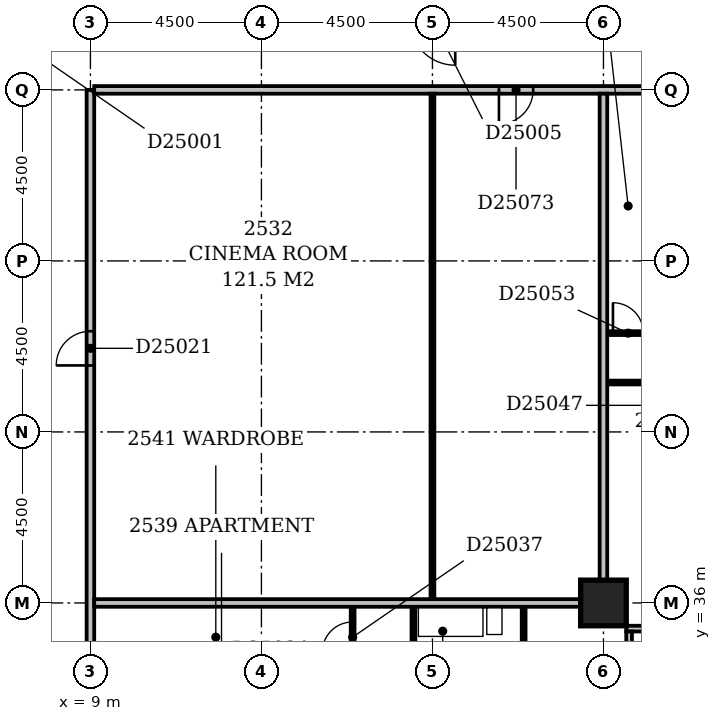
"""IFC4 building model, lengths in metres.
Left out: names, types, materials, properties, quantities, classifications, styles, units other than length and angle.
Written with IfcOpenShell. Run it as: python <this file> out.ifc"""

import sys

from ifc_helpers import new_model, si_unit, direction, frame, frame_2d, origin, origin_2d, place, context, subcontext, project, spatial, rectangle, extrude, element, fill, save


model = new_model("IFC4")
c1 = context("Model", 3, precision=1e-05, world=origin(), true_north=direction((0.0, 1.0)))
c2 = subcontext(c1, "Body", "Model", "MODEL_VIEW")
j1 = project(units=[si_unit("LENGTHUNIT", "METRE"), si_unit("PLANEANGLEUNIT", "RADIAN")], contexts=[c1])
p1 = place(None, origin())
s1 = spatial("IfcSite", under=j1, at=p1, CompositionType="ELEMENT")
p2 = place(p1, origin())
s2 = spatial("IfcBuilding", under=s1, at=p2, CompositionType="ELEMENT")
p3 = place(p2, frame((0.0, 0.0, 101.0)))
s3 = spatial("IfcBuildingStorey", under=s2, at=p3, CompositionType="ELEMENT", Elevation=101.0)
p4 = place(p3, frame((22.5, 36.0, -0.3), z_axis=(0.0, 0.0, 1.0), x_axis=(1.0, 0.0, 0.0)))
e1 = element("IfcColumn", 1, at=p4, inside=s3, PredefinedType="COLUMN", context=c2, shape_type="SweptSolid", body=[
    extrude(rectangle(XDim=1.2, YDim=1.2, at=origin_2d()), origin(), (0.0, 0.0, 1.0), 3.6),
])
p5 = place(p3, frame((23.175, 17.4, 0.0), z_axis=(0.0, 0.0, 1.0), x_axis=(0.0, 1.0, 0.0)))
e2 = element("IfcWall", 2, at=p5, inside=s3, PredefinedType="STANDARD", context=c2, shape_type="SweptSolid", body=[
    extrude(rectangle(XDim=17.85, YDim=0.15, at=frame_2d((8.925, 0.0))), origin(), (0.0, 0.0, 1.0), 2.7),
])
p6 = place(p5, frame((1.65, 0.0, 0.6)))
e3 = element("IfcOpeningElement", 3, at=p6, cuts=e2, PredefinedType="OPENING", context=c2, shape_type="SweptSolid", body=[
    extrude(rectangle(XDim=2.4, YDim=1.8, at=frame_2d((1.2, 0.9))), frame((0.0, 0.087, 0.0), z_axis=(0.0, -1.0, 0.0), x_axis=(1.0, 0.0, 0.0)), (0.0, 0.0, 1.0), 0.174),
])
p7 = place(p5, frame((7.769, 0.0, 0.6)))
e4 = element("IfcOpeningElement", 4, at=p7, cuts=e2, PredefinedType="OPENING", context=c2, shape_type="SweptSolid", body=[
    extrude(rectangle(XDim=0.9, YDim=1.8, at=frame_2d((0.45, 0.9))), frame((0.0, 0.087, 0.0), z_axis=(0.0, -1.0, 0.0), x_axis=(1.0, 0.0, 0.0)), (0.0, 0.0, 1.0), 0.174),
])
p8 = place(p5, frame((10.65, 0.0, 0.6)))
e5 = element("IfcOpeningElement", 5, at=p8, cuts=e2, PredefinedType="OPENING", context=c2, shape_type="SweptSolid", body=[
    extrude(rectangle(XDim=2.4, YDim=1.8, at=frame_2d((1.2, 0.9))), frame((0.0, 0.087, 0.0), z_axis=(0.0, -1.0, 0.0), x_axis=(1.0, 0.0, 0.0)), (0.0, 0.0, 1.0), 0.174),
])
p9 = place(p5, frame((15.15, 0.0, 0.6)))
e6 = element("IfcOpeningElement", 6, at=p9, cuts=e2, PredefinedType="OPENING", context=c2, shape_type="SweptSolid", body=[
    extrude(rectangle(XDim=2.4, YDim=1.8, at=frame_2d((1.2, 0.9))), frame((0.0, 0.087, 0.0), z_axis=(0.0, -1.0, 0.0), x_axis=(1.0, 0.0, 0.0)), (0.0, 0.0, 1.0), 0.174),
])
p10 = place(p3, frame((23.1, 35.325, 0.0), z_axis=(0.0, 0.0, 1.0), x_axis=(1.0, 0.0, 0.0)))
e7 = element("IfcWall", 7, at=p10, inside=s3, PredefinedType="STANDARD", context=c2, shape_type="SweptSolid", body=[
    extrude(rectangle(XDim=45.15, YDim=0.15, at=frame_2d((22.575, 0.0))), origin(), (0.0, 0.0, 1.0), 2.7),
])
p11 = place(p10, frame((0.45, 0.0, 0.6)))
e8 = element("IfcOpeningElement", 8, at=p11, cuts=e7, PredefinedType="OPENING", context=c2, shape_type="SweptSolid", body=[
    extrude(rectangle(XDim=2.4, YDim=1.8, at=frame_2d((1.2, 0.9))), frame((0.0, 0.087, 0.0), z_axis=(0.0, -1.0, 0.0), x_axis=(1.0, 0.0, 0.0)), (0.0, 0.0, 1.0), 0.174),
])
p12 = place(p10, frame((5.728, 0.0, 0.6)))
e9 = element("IfcOpeningElement", 9, at=p12, cuts=e7, PredefinedType="OPENING", context=c2, shape_type="SweptSolid", body=[
    extrude(rectangle(XDim=1.8, YDim=1.8, at=frame_2d((0.9, 0.9))), frame((0.0, 0.087, 0.0), z_axis=(0.0, -1.0, 0.0), x_axis=(1.0, 0.0, 0.0)), (0.0, 0.0, 1.0), 0.174),
])
p13 = place(p10, frame((9.45, 0.0, 0.6)))
e10 = element("IfcOpeningElement", 10, at=p13, cuts=e7, PredefinedType="OPENING", context=c2, shape_type="SweptSolid", body=[
    extrude(rectangle(XDim=2.4, YDim=1.8, at=frame_2d((1.2, 0.9))), frame((0.0, 0.087, 0.0), z_axis=(0.0, -1.0, 0.0), x_axis=(1.0, 0.0, 0.0)), (0.0, 0.0, 1.0), 0.174),
])
p14 = place(p10, frame((13.95, 0.0, 0.6)))
e11 = element("IfcOpeningElement", 11, at=p14, cuts=e7, PredefinedType="OPENING", context=c2, shape_type="SweptSolid", body=[
    extrude(rectangle(XDim=2.4, YDim=1.8, at=frame_2d((1.2, 0.9))), frame((0.0, 0.087, 0.0), z_axis=(0.0, -1.0, 0.0), x_axis=(1.0, 0.0, 0.0)), (0.0, 0.0, 1.0), 0.174),
])
p15 = place(p10, frame((18.276, 0.0, 0.6)))
e12 = element("IfcOpeningElement", 12, at=p15, cuts=e7, PredefinedType="OPENING", context=c2, shape_type="SweptSolid", body=[
    extrude(rectangle(XDim=2.4, YDim=1.8, at=frame_2d((1.2, 0.9))), frame((0.0, 0.087, 0.0), z_axis=(0.0, -1.0, 0.0), x_axis=(1.0, 0.0, 0.0)), (0.0, 0.0, 1.0), 0.174),
])
p16 = place(p10, frame((22.95, 0.0, 0.6)))
e13 = element("IfcOpeningElement", 13, at=p16, cuts=e7, PredefinedType="OPENING", context=c2, shape_type="SweptSolid", body=[
    extrude(rectangle(XDim=2.4, YDim=1.8, at=frame_2d((1.2, 0.9))), frame((0.0, 0.087, 0.0), z_axis=(0.0, -1.0, 0.0), x_axis=(1.0, 0.0, 0.0)), (0.0, 0.0, 1.0), 0.174),
])
p17 = place(p10, frame((27.45, 0.0, 0.6)))
e14 = element("IfcOpeningElement", 14, at=p17, cuts=e7, PredefinedType="OPENING", context=c2, shape_type="SweptSolid", body=[
    extrude(rectangle(XDim=2.4, YDim=1.8, at=frame_2d((1.2, 0.9))), frame((0.0, 0.087, 0.0), z_axis=(0.0, -1.0, 0.0), x_axis=(1.0, 0.0, 0.0)), (0.0, 0.0, 1.0), 0.174),
])
p18 = place(p10, frame((33.921, 0.0, 0.6)))
e15 = element("IfcOpeningElement", 15, at=p18, cuts=e7, PredefinedType="OPENING", context=c2, shape_type="SweptSolid", body=[
    extrude(rectangle(XDim=0.6, YDim=1.8, at=frame_2d((0.3, 0.9))), frame((0.0, 0.087, 0.0), z_axis=(0.0, -1.0, 0.0), x_axis=(1.0, 0.0, 0.0)), (0.0, 0.0, 1.0), 0.174),
])
p19 = place(p10, frame((36.45, 0.0, 0.6)))
e16 = element("IfcOpeningElement", 16, at=p19, cuts=e7, PredefinedType="OPENING", context=c2, shape_type="SweptSolid", body=[
    extrude(rectangle(XDim=2.4, YDim=1.8, at=frame_2d((1.2, 0.9))), frame((0.0, 0.087, 0.0), z_axis=(0.0, -1.0, 0.0), x_axis=(1.0, 0.0, 0.0)), (0.0, 0.0, 1.0), 0.174),
])
p20 = place(p10, frame((40.95, 0.0, 0.6)))
e17 = element("IfcOpeningElement", 17, at=p20, cuts=e7, PredefinedType="OPENING", context=c2, shape_type="SweptSolid", body=[
    extrude(rectangle(XDim=2.4, YDim=1.8, at=frame_2d((1.2, 0.9))), frame((0.0, 0.087, 0.0), z_axis=(0.0, -1.0, 0.0), x_axis=(1.0, 0.0, 0.0)), (0.0, 0.0, 1.0), 0.174),
])
p21 = place(p3, frame((9.0, 5.0, 0.0), z_axis=(0.0, 0.0, 1.0), x_axis=(0.0, 1.0, 0.0)))
e18 = element("IfcWall", 18, at=p21, inside=s3, PredefinedType="PARTITIONING", context=c2, shape_type="SweptSolid", body=[
    extrude(rectangle(XDim=44.5, YDim=0.2, at=frame_2d((22.25, 0.0))), origin(), (0.0, 0.0, 1.0), 3.3),
])
p22 = place(p21, frame((18.4, 0.0, 0.0)))
e19 = element("IfcOpeningElement", 19, at=p22, cuts=e18, PredefinedType="OPENING", context=c2, shape_type="SweptSolid", body=[
    extrude(rectangle(XDim=1.0, YDim=2.1, at=frame_2d((0.5, 1.05))), frame((0.0, 0.112, 0.0), z_axis=(0.0, -1.0, 0.0), x_axis=(1.0, 0.0, 0.0)), (0.0, 0.0, 1.0), 0.224),
])
p23 = place(p21, frame((9.3, 0.0, 0.0)))
e20 = element("IfcOpeningElement", 20, at=p23, cuts=e18, PredefinedType="OPENING", context=c2, shape_type="SweptSolid", body=[
    extrude(rectangle(XDim=1.0, YDim=2.1, at=frame_2d((0.5, 1.05))), frame((0.0, 0.112, 0.0), z_axis=(0.0, -1.0, 0.0), x_axis=(1.0, 0.0, 0.0)), (0.0, 0.0, 1.0), 0.224),
])
p24 = place(p21, frame((37.25, 0.0, 0.0)))
e21 = element("IfcOpeningElement", 21, at=p24, cuts=e18, PredefinedType="OPENING", context=c2, shape_type="SweptSolid", body=[
    extrude(rectangle(XDim=0.9, YDim=2.1, at=frame_2d((0.45, 1.05))), frame((0.0, 0.112, 0.0), z_axis=(0.0, -1.0, 0.0), x_axis=(1.0, 0.0, 0.0)), (0.0, 0.0, 1.0), 0.224),
])
p25 = place(p21, frame((1.5, 0.0, 0.0)))
e22 = element("IfcOpeningElement", 22, at=p25, cuts=e18, PredefinedType="OPENING", context=c2, shape_type="SweptSolid", body=[
    extrude(rectangle(XDim=0.9, YDim=2.1, at=frame_2d((0.45, 1.05))), frame((0.0, 0.112, 0.0), z_axis=(0.0, -1.0, 0.0), x_axis=(1.0, 0.0, 0.0)), (0.0, 0.0, 1.0), 0.224),
])
p26 = place(p3, frame((17.5, 18.1, 0.0), z_axis=(0.0, 0.0, 1.0), x_axis=(0.0, 1.0, 0.0)))
e23 = element("IfcWall", 23, at=p26, inside=s3, PredefinedType="PARTITIONING", context=c2, shape_type="SweptSolid", body=[
    extrude(rectangle(XDim=17.8, YDim=0.1, at=frame_2d((8.9, 0.0))), origin(), (0.0, 0.0, 1.0), 3.3),
])
p27 = place(p26, frame((2.85, 0.0, 0.0)))
e24 = element("IfcOpeningElement", 24, at=p27, cuts=e23, PredefinedType="OPENING", context=c2, shape_type="SweptSolid", body=[
    extrude(rectangle(XDim=0.9, YDim=2.1, at=frame_2d((0.45, 1.05))), frame((0.0, 0.062, 0.0), z_axis=(0.0, -1.0, 0.0), x_axis=(1.0, 0.0, 0.0)), (0.0, 0.0, 1.0), 0.124),
])
p28 = place(p26, frame((8.4, 0.0, 0.0)))
e25 = element("IfcOpeningElement", 25, at=p28, cuts=e23, PredefinedType="OPENING", context=c2, shape_type="SweptSolid", body=[
    extrude(rectangle(XDim=0.9, YDim=2.1, at=frame_2d((0.45, 1.05))), frame((0.0, 0.062, 0.0), z_axis=(0.0, -1.0, 0.0), x_axis=(1.0, 0.0, 0.0)), (0.0, 0.0, 1.0), 0.124),
])
p29 = place(p26, frame((14.05, 0.0, 0.0)))
e26 = element("IfcOpeningElement", 26, at=p29, cuts=e23, PredefinedType="OPENING", context=c2, shape_type="SweptSolid", body=[
    extrude(rectangle(XDim=0.9, YDim=2.1, at=frame_2d((0.45, 1.05))), frame((0.0, 0.062, 0.0), z_axis=(0.0, -1.0, 0.0), x_axis=(1.0, 0.0, 0.0)), (0.0, 0.0, 1.0), 0.124),
])
p30 = place(p3, frame((15.9, 24.7, 0.0), z_axis=(0.0, 0.0, 1.0), x_axis=(0.0, 1.0, 0.0)))
e27 = element("IfcWall", 27, at=p30, inside=s3, PredefinedType="PARTITIONING", context=c2, shape_type="SweptSolid", body=[
    extrude(rectangle(XDim=11.2, YDim=0.1, at=frame_2d((5.6, 0.0))), origin(), (0.0, 0.0, 1.0), 3.3),
])
p31 = place(p30, frame((0.8, 0.0, 0.0)))
e28 = element("IfcOpeningElement", 28, at=p31, cuts=e27, PredefinedType="OPENING", context=c2, shape_type="SweptSolid", body=[
    extrude(rectangle(XDim=0.8, YDim=2.1, at=frame_2d((0.4, 1.05))), frame((0.0, 0.062, 0.0), z_axis=(0.0, -1.0, 0.0), x_axis=(1.0, 0.0, 0.0)), (0.0, 0.0, 1.0), 0.124),
])
p32 = place(p30, frame((8.1, 0.0, 0.0)))
e29 = element("IfcOpeningElement", 29, at=p32, cuts=e27, PredefinedType="OPENING", context=c2, shape_type="SweptSolid", body=[
    extrude(rectangle(XDim=0.8, YDim=2.1, at=frame_2d((0.4, 1.05))), frame((0.0, 0.062, 0.0), z_axis=(0.0, -1.0, 0.0), x_axis=(1.0, 0.0, 0.0)), (0.0, 0.0, 1.0), 0.124),
])
p33 = place(p30, frame((4.3, 0.0, 0.0)))
e30 = element("IfcOpeningElement", 30, at=p33, cuts=e27, PredefinedType="OPENING", context=c2, shape_type="SweptSolid", body=[
    extrude(rectangle(XDim=0.8, YDim=2.1, at=frame_2d((0.4, 1.05))), frame((0.0, 0.062, 0.0), z_axis=(0.0, -1.0, 0.0), x_axis=(1.0, 0.0, 0.0)), (0.0, 0.0, 1.0), 0.124),
])
p34 = place(p30, frame((6.1, 0.0, 0.0)))
e31 = element("IfcOpeningElement", 31, at=p34, cuts=e27, PredefinedType="OPENING", context=c2, shape_type="SweptSolid", body=[
    extrude(rectangle(XDim=0.8, YDim=2.1, at=frame_2d((0.4, 1.05))), frame((0.0, 0.062, 0.0), z_axis=(0.0, -1.0, 0.0), x_axis=(1.0, 0.0, 0.0)), (0.0, 0.0, 1.0), 0.124),
])
p35 = place(p30, frame((10.0, 0.0, 0.0)))
e32 = element("IfcOpeningElement", 32, at=p35, cuts=e27, PredefinedType="OPENING", context=c2, shape_type="SweptSolid", body=[
    extrude(rectangle(XDim=0.8, YDim=2.1, at=frame_2d((0.4, 1.05))), frame((0.0, 0.062, 0.0), z_axis=(0.0, -1.0, 0.0), x_axis=(1.0, 0.0, 0.0)), (0.0, 0.0, 1.0), 0.124),
])
p36 = place(p30, frame((2.75, 0.0, 0.0)))
e33 = element("IfcOpeningElement", 33, at=p36, cuts=e27, PredefinedType="OPENING", context=c2, shape_type="SweptSolid", body=[
    extrude(rectangle(XDim=0.8, YDim=2.1, at=frame_2d((0.4, 1.05))), frame((0.0, 0.062, 0.0), z_axis=(0.0, -1.0, 0.0), x_axis=(1.0, 0.0, 0.0)), (0.0, 0.0, 1.0), 0.124),
])
p37 = place(p3, frame((20.4, 33.7, 0.0), z_axis=(0.0, 0.0, 1.0), x_axis=(0.0, 1.0, 0.0)))
e34 = element("IfcWall", 34, at=p37, inside=s3, PredefinedType="PLUMBINGWALL", context=c2, shape_type="SweptSolid", body=[
    extrude(rectangle(XDim=2.2, YDim=0.1, at=frame_2d((1.1, 0.0))), origin(), (0.0, 0.0, 1.0), 3.3),
])
p38 = place(p3, frame((9.1, 36.0, 0.0), z_axis=(0.0, 0.0, 1.0), x_axis=(1.0, 0.0, 0.0)))
e35 = element("IfcWall", 35, at=p38, inside=s3, PredefinedType="PARTITIONING", context=c2, shape_type="SweptSolid", body=[
    extrude(rectangle(XDim=12.8, YDim=0.2, at=frame_2d((6.4, 0.0))), origin(), (0.0, 0.0, 1.0), 2.4),
])
p39 = place(p3, frame((18.0, 36.1, 0.0), z_axis=(0.0, 0.0, 1.0), x_axis=(0.0, 1.0, 0.0)))
e36 = element("IfcWall", 36, at=p39, inside=s3, PredefinedType="PARTITIONING", context=c2, shape_type="SweptSolid", body=[
    extrude(rectangle(XDim=13.3, YDim=0.1, at=frame_2d((6.65, 0.0))), origin(), (0.0, 0.0, 1.0), 3.3),
])
p40 = place(p3, frame((22.5, 36.6, 0.0), z_axis=(0.0, 0.0, 1.0), x_axis=(0.0, 1.0, 0.0)))
e37 = element("IfcWall", 37, at=p40, inside=s3, PredefinedType="PARTITIONING", context=c2, shape_type="SweptSolid", body=[
    extrude(rectangle(XDim=12.8, YDim=0.2, at=frame_2d((6.4, 0.0))), origin(), (0.0, 0.0, 1.0), 3.3),
])
p41 = place(p3, frame((22.6, 41.8, 0.0), z_axis=(0.0, 0.0, 1.0), x_axis=(1.0, 0.0, 0.0)))
e38 = element("IfcWall", 38, at=p41, inside=s3, PredefinedType="PARTITIONING", context=c2, shape_type="SweptSolid", body=[
    extrude(rectangle(XDim=4.3, YDim=0.1, at=frame_2d((2.15, 0.0))), origin(), (0.0, 0.0, 1.0), 3.3),
])
p42 = place(p41, frame((1.7, 0.0, 0.0)))
e39 = element("IfcOpeningElement", 39, at=p42, cuts=e38, PredefinedType="OPENING", context=c2, shape_type="SweptSolid", body=[
    extrude(rectangle(XDim=0.9, YDim=2.1, at=frame_2d((0.45, 1.05))), frame((0.0, 0.062, 0.0), z_axis=(0.0, -1.0, 0.0), x_axis=(1.0, 0.0, 0.0)), (0.0, 0.0, 1.0), 0.124),
])
p43 = place(p3, frame((22.6, 43.1, 0.0), z_axis=(0.0, 0.0, 1.0), x_axis=(1.0, 0.0, 0.0)))
e40 = element("IfcWall", 40, at=p43, inside=s3, PredefinedType="PARTITIONING", context=c2, shape_type="SweptSolid", body=[
    extrude(rectangle(XDim=1.15, YDim=0.1, at=frame_2d((0.575, 0.0))), origin(), (0.0, 0.0, 1.0), 3.3),
])
p44 = place(p43, frame((0.15, 0.0, 0.0)))
e41 = element("IfcOpeningElement", 41, at=p44, cuts=e40, PredefinedType="OPENING", context=c2, shape_type="SweptSolid", body=[
    extrude(rectangle(XDim=0.8, YDim=2.1, at=frame_2d((0.4, 1.05))), frame((0.0, 0.062, 0.0), z_axis=(0.0, -1.0, 0.0), x_axis=(1.0, 0.0, 0.0)), (0.0, 0.0, 1.0), 0.124),
])
p45 = place(p3, frame((9.1, 49.5, 0.0), z_axis=(0.0, 0.0, 1.0), x_axis=(1.0, 0.0, 0.0)))
e42 = element("IfcWall", 42, at=p45, inside=s3, PredefinedType="PARTITIONING", context=c2, shape_type="SweptSolid", body=[
    extrude(rectangle(XDim=57.8, YDim=0.2, at=frame_2d((28.9, 0.0))), origin(), (0.0, 0.0, 1.0), 3.3),
])
p46 = place(p45, frame((14.95, 0.0, 0.0)))
e43 = element("IfcOpeningElement", 43, at=p46, cuts=e42, PredefinedType="OPENING", context=c2, shape_type="SweptSolid", body=[
    extrude(rectangle(XDim=1.0, YDim=2.1, at=frame_2d((0.5, 1.05))), frame((0.0, 0.112, 0.0), z_axis=(0.0, -1.0, 0.0), x_axis=(1.0, 0.0, 0.0)), (0.0, 0.0, 1.0), 0.224),
])
p47 = place(p45, frame((20.6, 0.0, 0.0)))
e44 = element("IfcOpeningElement", 44, at=p47, cuts=e42, PredefinedType="OPENING", context=c2, shape_type="SweptSolid", body=[
    extrude(rectangle(XDim=1.0, YDim=2.1, at=frame_2d((0.5, 1.05))), frame((0.0, 0.112, 0.0), z_axis=(0.0, -1.0, 0.0), x_axis=(1.0, 0.0, 0.0)), (0.0, 0.0, 1.0), 0.224),
])
p48 = place(p45, frame((27.2, 0.0, 0.0)))
e45 = element("IfcOpeningElement", 45, at=p48, cuts=e42, PredefinedType="OPENING", context=c2, shape_type="SweptSolid", body=[
    extrude(rectangle(XDim=1.0, YDim=2.1, at=frame_2d((0.5, 1.05))), frame((0.0, 0.112, 0.0), z_axis=(0.0, -1.0, 0.0), x_axis=(1.0, 0.0, 0.0)), (0.0, 0.0, 1.0), 0.224),
])
p49 = place(p45, frame((40.7, 0.0, 0.0)))
e46 = element("IfcOpeningElement", 46, at=p49, cuts=e42, PredefinedType="OPENING", context=c2, shape_type="SweptSolid", body=[
    extrude(rectangle(XDim=1.0, YDim=2.1, at=frame_2d((0.5, 1.05))), frame((0.0, 0.112, 0.0), z_axis=(0.0, -1.0, 0.0), x_axis=(1.0, 0.0, 0.0)), (0.0, 0.0, 1.0), 0.224),
])
p50 = place(p45, frame((10.65, 0.0, 0.0)))
e47 = element("IfcOpeningElement", 47, at=p50, cuts=e42, PredefinedType="OPENING", context=c2, shape_type="SweptSolid", body=[
    extrude(rectangle(XDim=0.9, YDim=2.1, at=frame_2d((0.45, 1.05))), frame((0.0, 0.112, 0.0), z_axis=(0.0, -1.0, 0.0), x_axis=(1.0, 0.0, 0.0)), (0.0, 0.0, 1.0), 0.224),
])
p51 = place(p24, origin())
e48 = element("IfcDoor", 48, at=p51, inside=s3, OperationType="SINGLE_SWING_LEFT", PredefinedType="DOOR", context=c2, shape_type="SweptSolid", body=[
    extrude(rectangle(XDim=0.9, YDim=2.1, at=frame_2d((0.45, 1.05))), frame((0.0, 0.025, 0.0), z_axis=(0.0, -1.0, 0.0), x_axis=(1.0, 0.0, 0.0)), (0.0, 0.0, 1.0), 0.05),
])
fill(e21, e48)
p52 = place(p35, origin())
e49 = element("IfcDoor", 49, at=p52, inside=s3, OperationType="SINGLE_SWING_LEFT", PredefinedType="DOOR", context=c2, shape_type="SweptSolid", body=[
    extrude(rectangle(XDim=0.8, YDim=2.1, at=frame_2d((0.4, 1.05))), frame((0.0, 0.025, 0.0), z_axis=(0.0, -1.0, 0.0), x_axis=(1.0, 0.0, 0.0)), (0.0, 0.0, 1.0), 0.05),
])
fill(e32, e49)
p53 = place(p44, origin())
e50 = element("IfcDoor", 50, at=p53, inside=s3, OperationType="SINGLE_SWING_LEFT", PredefinedType="DOOR", context=c2, shape_type="SweptSolid", body=[
    extrude(rectangle(XDim=0.8, YDim=2.1, at=frame_2d((0.4, 1.05))), frame((0.0, 0.025, 0.0), z_axis=(0.0, -1.0, 0.0), x_axis=(1.0, 0.0, 0.0)), (0.0, 0.0, 1.0), 0.05),
])
fill(e41, e50)
p54 = place(p50, frame((0.9, 0.0, 0.0), z_axis=(0.0, 0.0, 1.0), x_axis=(-1.0, 0.0, 0.0)))
e51 = element("IfcDoor", 51, at=p54, inside=s3, OperationType="SINGLE_SWING_RIGHT", PredefinedType="DOOR", context=c2, shape_type="SweptSolid", body=[
    extrude(rectangle(XDim=0.9, YDim=2.1, at=frame_2d((0.45, 1.05))), frame((0.0, 0.025, 0.0), z_axis=(0.0, -1.0, 0.0), x_axis=(1.0, 0.0, 0.0)), (0.0, 0.0, 1.0), 0.05),
])
fill(e47, e51)
save(model, sys.argv[1])
